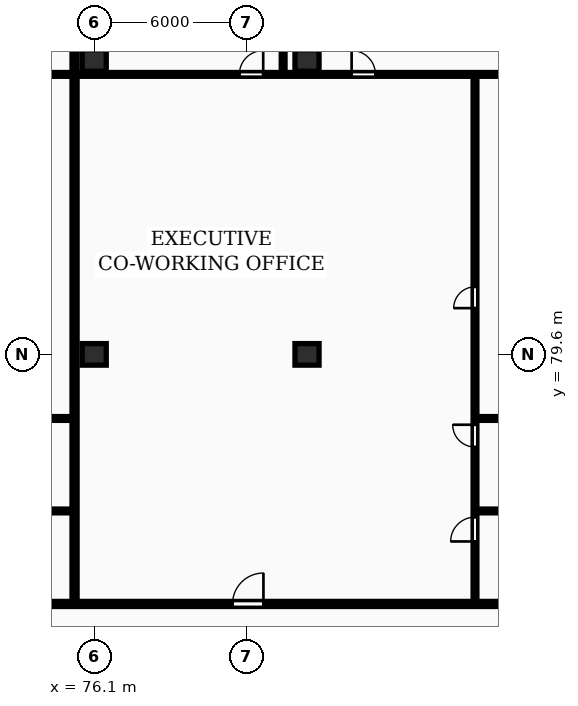
"""IFC4 building model, lengths in metres.
Left out: names, types, materials, properties, quantities, classifications, styles, units other than length and angle.
Written with IfcOpenShell. Run it as: python <this file> out.ifc"""

import sys

from ifc_helpers import new_model, si_unit, direction, frame, frame_2d, origin, origin_2d, place, context, subcontext, project, spatial, rectangle, extrude, element, fill, save


model = new_model("IFC4")
c1 = context("Model", 3, precision=1e-05, world=origin(), true_north=direction((0.0, 1.0)))
c2 = subcontext(c1, "Body", "Model", "MODEL_VIEW")
j1 = project(units=[si_unit("LENGTHUNIT", "METRE"), si_unit("PLANEANGLEUNIT", "RADIAN")], contexts=[c1])
p1 = place(None, origin())
s1 = spatial("IfcSite", under=j1, at=p1, CompositionType="ELEMENT")
p2 = place(p1, origin())
s2 = spatial("IfcBuilding", under=s1, at=p2, CompositionType="ELEMENT")
p3 = place(p2, frame((0.0, 0.0, 113.3)))
s3 = spatial("IfcBuildingStorey", under=s2, at=p3, CompositionType="ELEMENT", Elevation=113.3)
for number, where, z_axis, x_axis in (
    (1, (76.1, 79.6, 0.0), (0.0, 0.0, 1.0), (1.0, 0.0, 0.0)),
    (2, (76.1, 91.2, 0.0), (0.0, 0.0, 1.0), (1.0, 0.0, 0.0)),
    (3, (84.5, 79.6, 0.0), (0.0, 0.0, 1.0), (1.0, 0.0, 0.0)),
    (4, (84.5, 91.2, 0.0), (0.0, 0.0, 1.0), (1.0, 0.0, 0.0)),
):
    element("IfcColumn", number, at=place(p3, frame(where, z_axis=z_axis, x_axis=x_axis)), inside=s3, PredefinedType="COLUMN", context=c2, shape_type="SweptSolid", body=[
        extrude(rectangle(XDim=0.95, YDim=0.85, at=origin_2d()), origin(), (0.0, 0.0, 1.0), 3.25),
    ])
p4 = place(p3, frame((75.325, 69.83, 0.0), z_axis=(0.0, 0.0, 1.0), x_axis=(0.0, 1.0, 0.0)))
e5 = element("IfcWall", 5, at=p4, inside=s3, PredefinedType="PARTITIONING", context=c2, shape_type="SweptSolid", body=[
    extrude(rectangle(XDim=26.07, YDim=0.2, at=frame_2d((13.035, 0.0))), origin(), (0.0, 0.0, 1.0), 2.97),
])
for number, where, z_axis, x_axis in (
    (6, (71.885, 73.42, 0.0), (0.0, 0.0, 1.0), (1.0, 0.0, 0.0)),
    (7, (71.885, 77.07, 0.0), (0.0, 0.0, 1.0), (1.0, 0.0, 0.0)),
):
    element("IfcWall", number, at=place(p3, frame(where, z_axis=z_axis, x_axis=x_axis)), inside=s3, PredefinedType="PARTITIONING", context=c2, shape_type="SweptSolid", body=[
        extrude(rectangle(XDim=3.36, YDim=0.15, at=frame_2d((1.68, 0.0))), origin(), (0.0, 0.0, 1.0), 2.97),
    ])
p5 = place(p3, frame((57.68, 90.65, 0.0), z_axis=(0.0, 0.0, 1.0), x_axis=(1.0, 0.0, 0.0)))
e8 = element("IfcWall", 8, at=p5, inside=s3, PredefinedType="PARTITIONING", context=c2, shape_type="SweptSolid", body=[
    extrude(rectangle(XDim=17.565, YDim=0.15, at=frame_2d((8.782, 0.0))), origin(), (0.0, 0.0, 1.0), 2.97),
])
p6 = place(p5, frame((6.172, 0.0, 0.0)))
e9 = element("IfcOpeningElement", 9, at=p6, cuts=e8, PredefinedType="OPENING", context=c2, shape_type="SweptSolid", body=[
    extrude(rectangle(XDim=0.94, YDim=2.1, at=frame_2d((0.47, 1.05))), frame((0.0, 0.085, 0.0), z_axis=(0.0, -1.0, 0.0), x_axis=(1.0, 0.0, 0.0)), (0.0, 0.0, 1.0), 0.17),
])
p7 = place(p5, frame((7.719, 0.0, 0.0)))
e10 = element("IfcOpeningElement", 10, at=p7, cuts=e8, PredefinedType="OPENING", context=c2, shape_type="SweptSolid", body=[
    extrude(rectangle(XDim=0.94, YDim=2.1, at=frame_2d((0.47, 1.05))), frame((0.0, 0.085, 0.0), z_axis=(0.0, -1.0, 0.0), x_axis=(1.0, 0.0, 0.0)), (0.0, 0.0, 1.0), 0.17),
])
for number, where, z_axis, x_axis in (
    (11, (91.191, 73.42, 0.0), (0.0, 0.0, 1.0), (1.0, 0.0, 0.0)),
    (12, (91.191, 77.07, 0.0), (0.0, 0.0, 1.0), (1.0, 0.0, 0.0)),
):
    element("IfcWall", number, at=place(p3, frame(where, z_axis=z_axis, x_axis=x_axis)), inside=s3, PredefinedType="PARTITIONING", context=c2, shape_type="SweptSolid", body=[
        extrude(rectangle(XDim=3.13, YDim=0.15, at=frame_2d((1.565, 0.0))), origin(), (0.0, 0.0, 1.0), 2.97),
    ])
p8 = place(p3, frame((91.131, 69.81, 0.0), z_axis=(0.0, 0.0, 1.0), x_axis=(0.0, 1.0, 0.0)))
e13 = element("IfcWall", 13, at=p8, inside=s3, PredefinedType="PARTITIONING", context=c2, shape_type="SweptSolid", body=[
    extrude(rectangle(XDim=20.78, YDim=0.15, at=frame_2d((10.39, 0.0))), origin(), (0.0, 0.0, 1.0), 2.97),
])
p9 = place(p8, frame((2.406, 0.0, 0.0)))
e14 = element("IfcOpeningElement", 14, at=p9, cuts=e13, PredefinedType="OPENING", context=c2, shape_type="SweptSolid", body=[
    extrude(rectangle(XDim=0.96, YDim=2.1, at=frame_2d((0.48, 1.05))), frame((0.0, 0.085, 0.0), z_axis=(0.0, -1.0, 0.0), x_axis=(1.0, 0.0, 0.0)), (0.0, 0.0, 1.0), 0.17),
])
p10 = place(p8, frame((6.133, 0.0, 0.0)))
e15 = element("IfcOpeningElement", 15, at=p10, cuts=e13, PredefinedType="OPENING", context=c2, shape_type="SweptSolid", body=[
    extrude(rectangle(XDim=0.88, YDim=2.06, at=frame_2d((0.44, 1.03))), frame((0.0, 0.085, 0.0), z_axis=(0.0, -1.0, 0.0), x_axis=(1.0, 0.0, 0.0)), (0.0, 0.0, 1.0), 0.17),
])
p11 = place(p8, frame((11.615, 0.0, 0.0)))
e16 = element("IfcOpeningElement", 16, at=p11, cuts=e13, PredefinedType="OPENING", context=c2, shape_type="SweptSolid", body=[
    extrude(rectangle(XDim=0.84, YDim=2.04, at=frame_2d((0.42, 1.02))), frame((0.0, 0.085, 0.0), z_axis=(0.0, -1.0, 0.0), x_axis=(1.0, 0.0, 0.0)), (0.0, 0.0, 1.0), 0.17),
])
p12 = place(p3, frame((83.558, 90.73, 0.0), z_axis=(0.0, 0.0, 1.0), x_axis=(0.0, 1.0, 0.0)))
e17 = element("IfcWall", 17, at=p12, inside=s3, PredefinedType="PARTITIONING", context=c2, shape_type="SweptSolid", body=[
    extrude(rectangle(XDim=5.17, YDim=0.15, at=frame_2d((2.585, 0.0))), origin(), (0.0, 0.0, 1.0), 2.97),
])
p13 = place(p3, frame((75.405, 90.65, 0.0), z_axis=(0.0, 0.0, 1.0), x_axis=(1.0, 0.0, 0.0)))
e18 = element("IfcWall", 18, at=p13, inside=s3, PredefinedType="PARTITIONING", context=c2, shape_type="SweptSolid", body=[
    extrude(rectangle(XDim=18.916, YDim=0.15, at=frame_2d((9.458, 0.0))), origin(), (0.0, 0.0, 1.0), 2.97),
])
p14 = place(p13, frame((6.426, 0.0, 0.0)))
e19 = element("IfcOpeningElement", 19, at=p14, cuts=e18, PredefinedType="OPENING", context=c2, shape_type="SweptSolid", body=[
    extrude(rectangle(XDim=0.94, YDim=2.1, at=frame_2d((0.47, 1.05))), frame((0.0, 0.085, 0.0), z_axis=(0.0, -1.0, 0.0), x_axis=(1.0, 0.0, 0.0)), (0.0, 0.0, 1.0), 0.17),
])
p15 = place(p13, frame((10.856, 0.0, 0.0)))
e20 = element("IfcOpeningElement", 20, at=p15, cuts=e18, PredefinedType="OPENING", context=c2, shape_type="SweptSolid", body=[
    extrude(rectangle(XDim=0.94, YDim=2.1, at=frame_2d((0.47, 1.05))), frame((0.0, 0.085, 0.0), z_axis=(0.0, -1.0, 0.0), x_axis=(1.0, 0.0, 0.0)), (0.0, 0.0, 1.0), 0.17),
])
p16 = place(p3, frame((57.6, 69.75, 0.0), z_axis=(0.0, 0.0, 1.0), x_axis=(1.0, 0.0, 0.0)))
e21 = element("IfcWall", 21, at=p16, inside=s3, PredefinedType="PARTITIONING", context=c2, shape_type="SweptSolid", body=[
    extrude(rectangle(XDim=73.0, YDim=0.2, at=frame_2d((36.5, 0.0))), origin(), (0.0, 0.0, 1.0), 2.97),
])
p17 = place(p16, frame((7.172, 0.0, 0.0)))
e22 = element("IfcOpeningElement", 22, at=p17, cuts=e21, PredefinedType="OPENING", context=c2, shape_type="SweptSolid", body=[
    extrude(rectangle(XDim=1.22, YDim=2.18, at=frame_2d((0.61, 1.09))), frame((0.0, 0.11, 0.0), z_axis=(0.0, -1.0, 0.0), x_axis=(1.0, 0.0, 0.0)), (0.0, 0.0, 1.0), 0.22),
])
p18 = place(p16, frame((23.96, 0.0, 0.0)))
e23 = element("IfcOpeningElement", 23, at=p18, cuts=e21, PredefinedType="OPENING", context=c2, shape_type="SweptSolid", body=[
    extrude(rectangle(XDim=1.22, YDim=2.18, at=frame_2d((0.61, 1.09))), frame((0.0, 0.11, 0.0), z_axis=(0.0, -1.0, 0.0), x_axis=(1.0, 0.0, 0.0)), (0.0, 0.0, 1.0), 0.22),
])
p19 = place(p16, frame((38.846, 0.0, 0.0)))
e24 = element("IfcOpeningElement", 24, at=p19, cuts=e21, PredefinedType="OPENING", context=c2, shape_type="SweptSolid", body=[
    extrude(rectangle(XDim=0.95, YDim=2.15, at=frame_2d((0.475, 1.075))), frame((0.0, 0.11, 0.0), z_axis=(0.0, -1.0, 0.0), x_axis=(1.0, 0.0, 0.0)), (0.0, 0.0, 1.0), 0.22),
])
p20 = place(p16, frame((50.262, 0.0, 0.0)))
e25 = element("IfcOpeningElement", 25, at=p20, cuts=e21, PredefinedType="OPENING", context=c2, shape_type="SweptSolid", body=[
    extrude(rectangle(XDim=0.95, YDim=2.15, at=frame_2d((0.475, 1.075))), frame((0.0, 0.11, 0.0), z_axis=(0.0, -1.0, 0.0), x_axis=(1.0, 0.0, 0.0)), (0.0, 0.0, 1.0), 0.22),
])
p21 = place(p16, frame((63.754, 0.0, 0.0)))
e26 = element("IfcOpeningElement", 26, at=p21, cuts=e21, PredefinedType="OPENING", context=c2, shape_type="SweptSolid", body=[
    extrude(rectangle(XDim=0.95, YDim=2.15, at=frame_2d((0.475, 1.075))), frame((0.0, 0.11, 0.0), z_axis=(0.0, -1.0, 0.0), x_axis=(1.0, 0.0, 0.0)), (0.0, 0.0, 1.0), 0.22),
])
p22 = place(p9, origin())
e27 = element("IfcDoor", 27, at=p22, inside=s3, OperationType="SINGLE_SWING_LEFT", PredefinedType="DOOR", context=c2, shape_type="SweptSolid", body=[
    extrude(rectangle(XDim=0.96, YDim=2.1, at=frame_2d((0.48, 1.05))), frame((0.0, 0.025, 0.0), z_axis=(0.0, -1.0, 0.0), x_axis=(1.0, 0.0, 0.0)), (0.0, 0.0, 1.0), 0.05),
])
fill(e14, e27)
p23 = place(p10, origin())
e28 = element("IfcDoor", 28, at=p23, inside=s3, OperationType="SINGLE_SWING_RIGHT", PredefinedType="DOOR", context=c2, shape_type="SweptSolid", body=[
    extrude(rectangle(XDim=0.88, YDim=2.06, at=frame_2d((0.44, 1.03))), frame((0.0, 0.025, 0.0), z_axis=(0.0, -1.0, 0.0), x_axis=(1.0, 0.0, 0.0)), (0.0, 0.0, 1.0), 0.05),
])
fill(e15, e28)
p24 = place(p11, origin())
e29 = element("IfcDoor", 29, at=p24, inside=s3, OperationType="SINGLE_SWING_LEFT", PredefinedType="DOOR", context=c2, shape_type="SweptSolid", body=[
    extrude(rectangle(XDim=0.84, YDim=2.04, at=frame_2d((0.42, 1.02))), frame((0.0, 0.025, 0.0), z_axis=(0.0, -1.0, 0.0), x_axis=(1.0, 0.0, 0.0)), (0.0, 0.0, 1.0), 0.05),
])
fill(e16, e29)
p25 = place(p14, origin())
e30 = element("IfcDoor", 30, at=p25, inside=s3, OperationType="SINGLE_SWING_RIGHT", PredefinedType="DOOR", context=c2, shape_type="SweptSolid", body=[
    extrude(rectangle(XDim=0.94, YDim=2.1, at=frame_2d((0.47, 1.05))), frame((0.0, 0.025, 0.0), z_axis=(0.0, -1.0, 0.0), x_axis=(1.0, 0.0, 0.0)), (0.0, 0.0, 1.0), 0.05),
])
fill(e19, e30)
p26 = place(p15, origin())
e31 = element("IfcDoor", 31, at=p26, inside=s3, OperationType="SINGLE_SWING_LEFT", PredefinedType="DOOR", context=c2, shape_type="SweptSolid", body=[
    extrude(rectangle(XDim=0.94, YDim=2.1, at=frame_2d((0.47, 1.05))), frame((0.0, 0.025, 0.0), z_axis=(0.0, -1.0, 0.0), x_axis=(1.0, 0.0, 0.0)), (0.0, 0.0, 1.0), 0.05),
])
fill(e20, e31)
p27 = place(p18, origin())
e32 = element("IfcDoor", 32, at=p27, inside=s3, OperationType="SINGLE_SWING_RIGHT", PredefinedType="DOOR", context=c2, shape_type="SweptSolid", body=[
    extrude(rectangle(XDim=1.22, YDim=2.18, at=frame_2d((0.61, 1.09))), frame((0.0, 0.025, 0.0), z_axis=(0.0, -1.0, 0.0), x_axis=(1.0, 0.0, 0.0)), (0.0, 0.0, 1.0), 0.05),
])
fill(e23, e32)
save(model, sys.argv[1])
